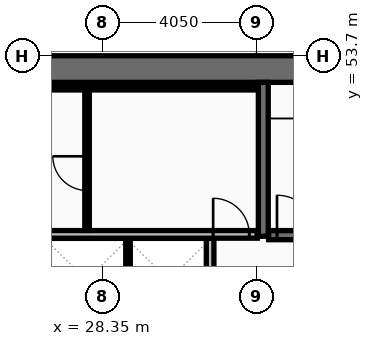
"""IFC4 building model, lengths in metres.
Left out: names, types, materials, properties, quantities, classifications, styles, units other than length and angle.
Written with IfcOpenShell. Run it as: python <this file> out.ifc"""

import sys

from ifc_helpers import new_model, si_unit, direction, frame, frame_2d, origin, place, context, subcontext, project, spatial, rectangle, extrude, element, fill, save


model = new_model("IFC4")
c1 = context("Model", 3, precision=1e-05, world=origin(), true_north=direction((0.0, 1.0)))
c2 = subcontext(c1, "Body", "Model", "MODEL_VIEW")
j1 = project(units=[si_unit("LENGTHUNIT", "METRE"), si_unit("PLANEANGLEUNIT", "RADIAN")], contexts=[c1])
p1 = place(None, origin())
s1 = spatial("IfcSite", under=j1, at=p1, CompositionType="ELEMENT")
p2 = place(p1, origin())
s2 = spatial("IfcBuilding", under=s1, at=p2, CompositionType="ELEMENT")
p3 = place(p2, frame((0.0, 0.0, 111.0)))
s3 = spatial("IfcBuildingStorey", under=s2, at=p3, CompositionType="ELEMENT", Elevation=111.0)
p4 = place(p3, frame((16.2, 53.35, 0.0), z_axis=(0.0, 0.0, 1.0), x_axis=(1.0, 0.0, 0.0)))
e1 = element("IfcWall", 1, at=p4, inside=s3, PredefinedType="SHEAR", context=c2, shape_type="SweptSolid", body=[
    extrude(rectangle(XDim=40.5, YDim=0.7, at=frame_2d((20.25, 0.0))), origin(), (0.0, 0.0, 1.0), 3.44),
])
p5 = place(p3, frame((32.58, 48.95, 0.0), z_axis=(0.0, 0.0, 1.0), x_axis=(0.0, 1.0, 0.0)))
e2 = element("IfcWall", 2, at=p5, inside=s3, PredefinedType="SHEAR", context=c2, shape_type="SweptSolid", body=[
    extrude(rectangle(XDim=4.05, YDim=0.26, at=frame_2d((2.025, 0.0))), origin(), (0.0, 0.0, 1.0), 3.44),
])
p6 = place(p3, frame((32.72, 48.98, 0.0), z_axis=(0.0, 0.0, 1.0), x_axis=(1.0, 0.0, 0.0)))
e3 = element("IfcWall", 3, at=p6, inside=s3, PredefinedType="SHEAR", context=c2, shape_type="SweptSolid", body=[
    extrude(rectangle(XDim=7.56, YDim=0.24, at=frame_2d((3.78, 0.0))), origin(), (0.0, 0.0, 1.0), 3.44),
])
p7 = place(p6, frame((0.22, 0.0, 0.0)))
e4 = element("IfcOpeningElement", 4, at=p7, cuts=e3, PredefinedType="OPENING", context=c2, shape_type="SweptSolid", body=[
    extrude(rectangle(XDim=1.05, YDim=2.15, at=frame_2d((0.525, 1.075))), frame((0.0, 0.13, 0.0), z_axis=(0.0, -1.0, 0.0), x_axis=(1.0, 0.0, 0.0)), (0.0, 0.0, 1.0), 0.26),
])
p8 = place(p3, frame((31.18, 46.805, 0.0), z_axis=(0.0, 0.0, 1.0), x_axis=(0.0, 1.0, 0.0)))
e5 = element("IfcWall", 5, at=p8, inside=s3, PredefinedType="PARTITIONING", context=c2, shape_type="SweptSolid", body=[
    extrude(rectangle(XDim=2.09, YDim=0.2, at=frame_2d((1.045, 0.0))), origin(), (0.0, 0.0, 1.0), 3.44),
])
p9 = place(p3, frame((29.02, 46.805, 0.0), z_axis=(0.0, 0.0, 1.0), x_axis=(0.0, 1.0, 0.0)))
e6 = element("IfcWall", 6, at=p9, inside=s3, PredefinedType="PARTITIONING", context=c2, shape_type="SweptSolid", body=[
    extrude(rectangle(XDim=2.09, YDim=0.12, at=frame_2d((1.045, 0.0))), origin(), (0.0, 0.0, 1.0), 3.44),
])
p10 = place(p3, frame((24.7, 52.86, 0.0), z_axis=(0.0, 0.0, 1.0), x_axis=(1.0, 0.0, 0.0)))
e7 = element("IfcWall", 7, at=p10, inside=s3, PredefinedType="PARTITIONING", context=c2, shape_type="SweptSolid", body=[
    extrude(rectangle(XDim=7.72, YDim=0.12, at=frame_2d((3.86, 0.0))), origin(), (0.0, 0.0, 1.0), 3.44),
])
p11 = place(p3, frame((24.7, 49.0, 0.0), z_axis=(0.0, 0.0, 1.0), x_axis=(1.0, 0.0, 0.0)))
e8 = element("IfcWall", 8, at=p11, inside=s3, PredefinedType="PARTITIONING", context=c2, shape_type="SweptSolid", body=[
    extrude(rectangle(XDim=7.72, YDim=0.2, at=frame_2d((3.86, 0.0))), origin(), (0.0, 0.0, 1.0), 3.44),
])
p12 = place(p11, frame((6.56, 0.0, 0.0)))
e9 = element("IfcOpeningElement", 9, at=p12, cuts=e8, PredefinedType="OPENING", context=c2, shape_type="SweptSolid", body=[
    extrude(rectangle(XDim=0.95, YDim=2.1, at=frame_2d((0.475, 1.05))), frame((0.0, 0.11, 0.0), z_axis=(0.0, -1.0, 0.0), x_axis=(1.0, 0.0, 0.0)), (0.0, 0.0, 1.0), 0.22),
])
p13 = place(p3, frame((27.942, 49.105, 0.0), z_axis=(0.0, 0.0, 1.0), x_axis=(0.0, 1.0, 0.0)))
e10 = element("IfcWall", 10, at=p13, inside=s3, PredefinedType="PARTITIONING", context=c2, shape_type="SweptSolid", body=[
    extrude(rectangle(XDim=3.69, YDim=0.12, at=frame_2d((1.845, 0.0))), origin(), (0.0, 0.0, 1.0), 3.44),
])
p14 = place(p13, frame((1.05, 0.0, 0.0)))
e11 = element("IfcOpeningElement", 11, at=p14, cuts=e10, PredefinedType="OPENING", context=c2, shape_type="SweptSolid", body=[
    extrude(rectangle(XDim=0.9, YDim=2.05, at=frame_2d((0.45, 1.025))), frame((0.0, 0.07, 0.0), z_axis=(0.0, -1.0, 0.0), x_axis=(1.0, 0.0, 0.0)), (0.0, 0.0, 1.0), 0.14),
])
p15 = place(p7, origin())
e12 = element("IfcDoor", 12, at=p15, inside=s3, OperationType="SINGLE_SWING_LEFT", PredefinedType="DOOR", context=c2, shape_type="SweptSolid", body=[
    extrude(rectangle(XDim=1.05, YDim=2.15, at=frame_2d((0.525, 1.075))), frame((0.0, 0.025, 0.0), z_axis=(0.0, -1.0, 0.0), x_axis=(1.0, 0.0, 0.0)), (0.0, 0.0, 1.0), 0.05),
])
fill(e4, e12)
p16 = place(p12, origin())
e13 = element("IfcDoor", 13, at=p16, inside=s3, OperationType="SINGLE_SWING_LEFT", PredefinedType="DOOR", context=c2, shape_type="SweptSolid", body=[
    extrude(rectangle(XDim=0.95, YDim=2.1, at=frame_2d((0.475, 1.05))), frame((0.0, 0.025, 0.0), z_axis=(0.0, -1.0, 0.0), x_axis=(1.0, 0.0, 0.0)), (0.0, 0.0, 1.0), 0.05),
])
fill(e9, e13)
p17 = place(p14, origin())
e14 = element("IfcDoor", 14, at=p17, inside=s3, OperationType="SINGLE_SWING_RIGHT", PredefinedType="DOOR", context=c2, shape_type="SweptSolid", body=[
    extrude(rectangle(XDim=0.9, YDim=2.05, at=frame_2d((0.45, 1.025))), frame((0.0, 0.025, 0.0), z_axis=(0.0, -1.0, 0.0), x_axis=(1.0, 0.0, 0.0)), (0.0, 0.0, 1.0), 0.05),
])
fill(e11, e14)
save(model, sys.argv[1])
